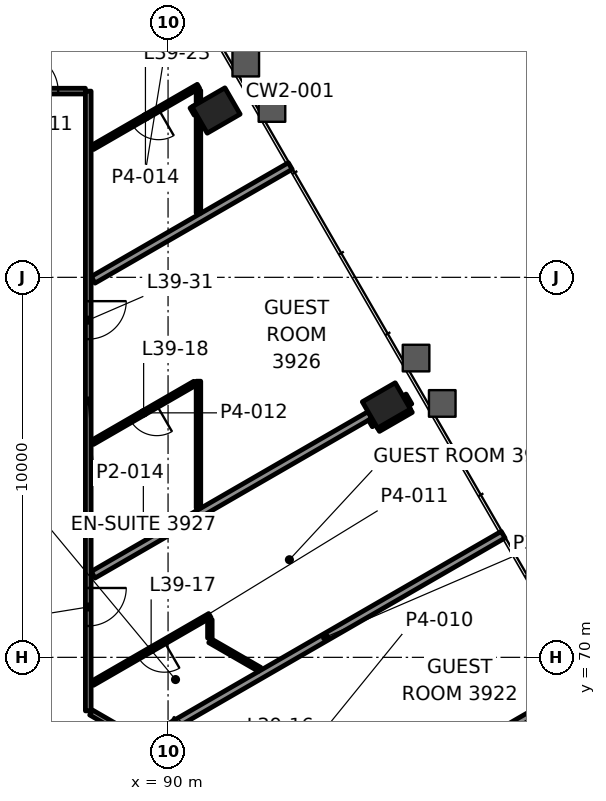
"""IFC4 building model, lengths in metres.
Left out: names, types, materials, properties, quantities, classifications, styles, units other than length and angle.
Written with IfcOpenShell. Run it as: python <this file> out.ifc"""

import sys

from ifc_helpers import new_model, si_unit, direction, frame, frame_2d, origin, origin_2d, place, context, subcontext, project, spatial, rectangle, hollow_rectangle, extrude, element, fill, save


model = new_model("IFC4")
c1 = context("Model", 3, precision=1e-05, world=origin(), true_north=direction((0.0, 1.0)))
c2 = subcontext(c1, "Body", "Model", "MODEL_VIEW")
j1 = project(units=[si_unit("LENGTHUNIT", "METRE"), si_unit("PLANEANGLEUNIT", "RADIAN")], contexts=[c1])
p1 = place(None, origin())
s1 = spatial("IfcSite", under=j1, at=p1, CompositionType="ELEMENT")
p2 = place(p1, origin())
s2 = spatial("IfcBuilding", under=s1, at=p2, CompositionType="ELEMENT")
p3 = place(p2, frame((0.0, 0.0, 171.4)))
s3 = spatial("IfcBuildingStorey", under=s2, at=p3, CompositionType="ELEMENT", Elevation=171.4)
for number, where, z_axis, x_axis in (
    (1, (95.744, 76.628, -0.0), (0.0, 0.0, 1.0), (-0.5, 0.866, 0.0)),
    (2, (91.263, 84.39, -0.0), (0.0, 0.0, 1.0), (-0.5, 0.866, 0.0)),
):
    element("IfcColumn", number, at=place(p3, frame(where, z_axis=z_axis, x_axis=x_axis)), inside=s3, PredefinedType="COLUMN", context=c2, shape_type="SweptSolid", body=[
        extrude(hollow_rectangle(XDim=0.8, YDim=1.0, WallThickness=0.05, at=origin_2d()), origin(), (0.0, 0.0, 1.0), 3.9),
    ])
p4 = place(p3, frame((78.2, 84.9, 0.0), z_axis=(0.0, 0.0, 1.0), x_axis=(1.0, 0.0, 0.0)))
e3 = element("IfcWall", 3, at=p4, inside=s3, PredefinedType="PARTITIONING", context=c2, shape_type="SweptSolid", body=[
    extrude(rectangle(XDim=9.625, YDim=0.15, at=frame_2d((4.812, 0.0))), origin(), (0.0, 0.0, 1.0), 3.1),
])
p5 = place(p4, frame((7.908, 0.0, 0.0)))
e4 = element("IfcOpeningElement", 4, at=p5, cuts=e3, PredefinedType="OPENING", context=c2, shape_type="SweptSolid", body=[
    extrude(rectangle(XDim=1.0, YDim=2.1, at=frame_2d((0.5, 1.05))), frame((0.0, 0.085, 0.0), z_axis=(0.0, -1.0, 0.0), x_axis=(1.0, 0.0, 0.0)), (0.0, 0.0, 1.0), 0.17),
])
p6 = place(p3, frame((93.951, 65.245, 0.0), z_axis=(0.0, 0.0, 1.0), x_axis=(0.866027052535, 0.49999714427, 0.0)))
e5 = element("IfcWall", 5, at=p6, inside=s3, PredefinedType="PARTITIONING", context=c2, shape_type="SweptSolid", body=[
    extrude(rectangle(XDim=6.745, YDim=0.2, at=frame_2d((3.372, 0.0))), origin(), (0.0, 0.0, 1.0), 3.1),
])
p7 = place(p3, frame((89.47, 67.832, 0.0), z_axis=(0.0, 0.0, 1.0), x_axis=(0.866022468619, 0.50000508382, 0.0)))
e6 = element("IfcWall", 6, at=p7, inside=s3, PredefinedType="PARTITIONING", context=c2, shape_type="SweptSolid", body=[
    extrude(rectangle(XDim=10.792, YDim=0.2, at=frame_2d((5.396, 0.0))), origin(), (0.0, 0.0, 1.0), 3.022),
])
p8 = place(p3, frame((91.1, 71.101, 0.0), z_axis=(0.0, 0.0, 1.0), x_axis=(-0.866045460162, -0.499965259726, 0.0)))
e7 = element("IfcWall", 7, at=p8, inside=s3, PredefinedType="PARTITIONING", context=c2, shape_type="SweptSolid", body=[
    extrude(rectangle(XDim=3.569, YDim=0.12, at=frame_2d((1.784, 0.0))), origin(), (0.0, 0.0, 1.0), 3.1),
])
p9 = place(p8, frame((1.384, 0.0, 0.0)))
e8 = element("IfcOpeningElement", 8, at=p9, cuts=e7, PredefinedType="OPENING", context=c2, shape_type="SweptSolid", body=[
    extrude(rectangle(XDim=0.8, YDim=2.1, at=frame_2d((0.4, 1.05))), frame((0.0, 0.07, 0.0), z_axis=(0.0, -1.0, 0.0), x_axis=(1.0, 0.0, 0.0)), (0.0, 0.0, 1.0), 0.14),
])
p10 = place(p3, frame((95.512, 76.032, 0.0), z_axis=(0.0, 0.0, 1.0), x_axis=(0.86597798544, 0.50008212199, 0.0)))
e9 = element("IfcWall", 9, at=p10, inside=s3, PredefinedType="PARTITIONING", context=c2, shape_type="SweptSolid", body=[
    extrude(rectangle(XDim=0.999, YDim=0.2, at=frame_2d((0.5, 0.0))), origin(), (0.0, 0.0, 1.0), 3.022),
])
p11 = place(p3, frame((88.027, 72.173, 0.0), z_axis=(0.0, 0.0, 1.0), x_axis=(0.866035743139, 0.499982091285, 0.0)))
e10 = element("IfcWall", 10, at=p11, inside=s3, PredefinedType="PARTITIONING", context=c2, shape_type="SweptSolid", body=[
    extrude(rectangle(XDim=8.411, YDim=0.2, at=frame_2d((4.206, 0.0))), origin(), (0.0, 0.0, 1.0), 3.1),
])
p12 = place(p3, frame((90.705, 77.212, 0.0), z_axis=(0.0, 0.0, 1.0), x_axis=(-0.866009247561, -0.500027982357, 0.0)))
e11 = element("IfcWall", 11, at=p12, inside=s3, PredefinedType="PARTITIONING", context=c2, shape_type="SweptSolid", body=[
    extrude(rectangle(XDim=3.113, YDim=0.12, at=frame_2d((1.556, 0.0))), origin(), (0.0, 0.0, 1.0), 3.1),
])
p13 = place(p12, frame((1.156, 0.0, 0.0)))
e12 = element("IfcOpeningElement", 12, at=p13, cuts=e11, PredefinedType="OPENING", context=c2, shape_type="SweptSolid", body=[
    extrude(rectangle(XDim=0.8, YDim=2.1, at=frame_2d((0.4, 1.05))), frame((0.0, 0.07, 0.0), z_axis=(0.0, -1.0, 0.0), x_axis=(1.0, 0.0, 0.0)), (0.0, 0.0, 1.0), 0.14),
])
p14 = place(p3, frame((88.027, 79.934, 0.0), z_axis=(0.0, 0.0, 1.0), x_axis=(0.866030178321, 0.499991730169, 0.0)))
e13 = element("IfcWall", 13, at=p14, inside=s3, PredefinedType="PARTITIONING", context=c2, shape_type="SweptSolid", body=[
    extrude(rectangle(XDim=5.991, YDim=0.2, at=frame_2d((2.995, 0.0))), origin(), (0.0, 0.0, 1.0), 3.022),
])
p15 = place(p3, frame((90.8, 85.028, 0.0), z_axis=(0.0, 0.0, 1.0), x_axis=(-0.866010186656, -0.500026355914, 0.0)))
e14 = element("IfcWall", 14, at=p15, inside=s3, PredefinedType="PARTITIONING", context=c2, shape_type="SweptSolid", body=[
    extrude(rectangle(XDim=3.222, YDim=0.12, at=frame_2d((1.611, 0.0))), origin(), (0.0, 0.0, 1.0), 3.022),
])
p16 = place(p15, frame((1.211, 0.0, 0.0)))
e15 = element("IfcOpeningElement", 15, at=p16, cuts=e14, PredefinedType="OPENING", context=c2, shape_type="SweptSolid", body=[
    extrude(rectangle(XDim=0.8, YDim=2.1, at=frame_2d((0.4, 1.05))), frame((0.0, 0.07, 0.0), z_axis=(0.0, -1.0, 0.0), x_axis=(1.0, 0.0, 0.0)), (0.0, 0.0, 1.0), 0.14),
])
p17 = place(p3, frame((83.471, 85.065, 0.0), z_axis=(0.0, 0.0, 1.0), x_axis=(0.866022862013, 0.500004402451, 0.0)))
e16 = element("IfcWall", 16, at=p17, inside=s3, PredefinedType="PARTITIONING", context=c2, shape_type="SweptSolid", body=[
    extrude(rectangle(XDim=7.371, YDim=0.2, at=frame_2d((3.685, 0.0))), origin(), (0.0, 0.0, 1.0), 3.022),
])
p18 = place(p3, frame((91.1, 70.508, 0.0), z_axis=(0.0, 0.0, 1.0), x_axis=(0.0, 1.0, 0.0)))
e17 = element("IfcWall", 17, at=p18, inside=s3, PredefinedType="PARTITIONING", context=c2, shape_type="SweptSolid", body=[
    extrude(rectangle(XDim=0.484, YDim=0.12, at=frame_2d((0.242, 0.0))), origin(), (0.0, 0.0, 1.0), 3.1),
])
p19 = place(p3, frame((90.8, 73.929, 0.0), z_axis=(0.0, 0.0, 1.0), x_axis=(0.0, 1.0, 0.0)))
e18 = element("IfcWall", 18, at=p19, inside=s3, PredefinedType="PARTITIONING", context=c2, shape_type="SweptSolid", body=[
    extrude(rectangle(XDim=3.337, YDim=0.12, at=frame_2d((1.668, 0.0))), origin(), (0.0, 0.0, 1.0), 3.1),
])
p20 = place(p3, frame((90.8, 81.69, 0.0), z_axis=(0.0, 0.0, 1.0), x_axis=(0.0, 1.0, 0.0)))
e19 = element("IfcWall", 19, at=p20, inside=s3, PredefinedType="PARTITIONING", context=c2, shape_type="SweptSolid", body=[
    extrude(rectangle(XDim=2.502, YDim=0.12, at=frame_2d((1.251, 0.0))), origin(), (0.0, 0.0, 1.0), 3.1),
])
p21 = place(p3, frame((90.8, 84.584, 0.0), z_axis=(0.0, 0.0, 1.0), x_axis=(0.0, 1.0, 0.0)))
e20 = element("IfcWall", 20, at=p21, inside=s3, PredefinedType="PARTITIONING", context=c2, shape_type="SweptSolid", body=[
    extrude(rectangle(XDim=0.334, YDim=0.12, at=frame_2d((0.167, 0.0))), origin(), (0.0, 0.0, 1.0), 3.022),
])
p22 = place(p3, frame((87.9, 84.899, 0.0), z_axis=(0.0, 0.0, 1.0), x_axis=(0.0, -1.0, 0.0)))
e21 = element("IfcWall", 21, at=p22, inside=s3, PredefinedType="PARTITIONING", context=c2, shape_type="SweptSolid", body=[
    extrude(rectangle(XDim=16.308, YDim=0.15, at=frame_2d((8.154, 0.0))), origin(), (0.0, 0.0, 1.0), 3.1),
])
p23 = place(p22, frame((5.527, 0.0, 0.0)))
e22 = element("IfcOpeningElement", 22, at=p23, cuts=e21, PredefinedType="OPENING", context=c2, shape_type="SweptSolid", body=[
    extrude(rectangle(XDim=1.0, YDim=2.1, at=frame_2d((0.5, 1.05))), frame((0.0, 0.085, 0.0), z_axis=(0.0, -1.0, 0.0), x_axis=(1.0, 0.0, 0.0)), (0.0, 0.0, 1.0), 0.17),
])
p24 = place(p22, frame((13.074, 0.0, 0.0)))
e23 = element("IfcOpeningElement", 23, at=p24, cuts=e21, PredefinedType="OPENING", context=c2, shape_type="SweptSolid", body=[
    extrude(rectangle(XDim=1.0, YDim=2.1, at=frame_2d((0.5, 1.05))), frame((0.0, 0.085, 0.0), z_axis=(0.0, -1.0, 0.0), x_axis=(1.0, 0.0, 0.0)), (0.0, 0.0, 1.0), 0.17),
])
p25 = place(p3, frame((96.327, 76.619, 0.0), z_axis=(0.0, 0.0, 1.0), x_axis=(-0.49965177357, 0.866226359082, 0.0)))
e24 = element("IfcWall", 24, at=p25, inside=s3, PredefinedType="PARTITIONING", context=c2, shape_type="SweptSolid", body=[
    extrude(rectangle(XDim=0.299, YDim=0.2, at=frame_2d((0.149, 0.0))), origin(), (0.0, 0.0, 1.0), 3.1),
])
p26 = place(p3, frame((95.461, 76.119, 0.0), z_axis=(0.0, 0.0, 1.0), x_axis=(-0.500359323436, 0.865817848887, 0.0)))
e25 = element("IfcWall", 25, at=p26, inside=s3, PredefinedType="PARTITIONING", context=c2, shape_type="SweptSolid", body=[
    extrude(rectangle(XDim=0.199, YDim=0.2, at=frame_2d((0.1, 0.0))), origin(), (0.0, 0.0, 1.0), 3.1),
])
p27 = place(p3, frame((90.74, 84.296, 0.0), z_axis=(0.0, 0.0, 1.0), x_axis=(-0.500333292614, 0.865832891673, 0.0)))
e26 = element("IfcWall", 26, at=p27, inside=s3, PredefinedType="PARTITIONING", context=c2, shape_type="SweptSolid", body=[
    extrude(rectangle(XDim=0.219, YDim=0.12, at=frame_2d((0.109, 0.0))), origin(), (0.0, 0.0, 1.0), 3.1),
])
p28 = place(p3, frame((92.408, 69.684, 0.0), z_axis=(0.0, 0.0, 1.0), x_axis=(-0.865986401109, 0.500067548531, 0.0)))
e27 = element("IfcWall", 27, at=p28, inside=s3, PredefinedType="PARTITIONING", context=c2, shape_type="SweptSolid", body=[
    extrude(rectangle(XDim=1.51, YDim=0.12, at=frame_2d((0.755, 0.0))), origin(), (0.0, 0.0, 1.0), 3.1),
])
p29 = place(p3, frame((87.975, 68.548, 0.0), z_axis=(0.0, 0.0, 1.0), x_axis=(0.866029648708, -0.499992647504, 0.0)))
e28 = element("IfcWall", 28, at=p29, inside=s3, PredefinedType="PARTITIONING", context=c2, shape_type="SweptSolid", body=[
    extrude(rectangle(XDim=15.461, YDim=0.15, at=frame_2d((7.73, 0.0))), origin(), (0.0, 0.0, 1.0), 3.1),
])
p30 = place(p29, frame((1.948, 0.0, 0.0)))
e29 = element("IfcOpeningElement", 29, at=p30, cuts=e28, PredefinedType="OPENING", context=c2, shape_type="SweptSolid", body=[
    extrude(rectangle(XDim=1.0, YDim=2.1, at=frame_2d((0.5, 1.05))), frame((0.0, 0.085, 0.0), z_axis=(0.0, -1.0, 0.0), x_axis=(1.0, 0.0, 0.0)), (0.0, 0.0, 1.0), 0.17),
])
p31 = place(p29, frame((7.602, 0.0, 0.0)))
e30 = element("IfcOpeningElement", 30, at=p31, cuts=e28, PredefinedType="OPENING", context=c2, shape_type="SweptSolid", body=[
    extrude(rectangle(XDim=1.0, YDim=2.1, at=frame_2d((0.5, 1.05))), frame((0.0, 0.085, 0.0), z_axis=(0.0, -1.0, 0.0), x_axis=(1.0, 0.0, 0.0)), (0.0, 0.0, 1.0), 0.17),
])
p32 = place(p5, origin())
e31 = element("IfcDoor", 31, at=p32, inside=s3, OperationType="SINGLE_SWING_LEFT", PredefinedType="DOOR", context=c2, shape_type="SweptSolid", body=[
    extrude(rectangle(XDim=1.0, YDim=2.1, at=frame_2d((0.5, 1.05))), frame((0.0, 0.025, 0.0), z_axis=(0.0, -1.0, 0.0), x_axis=(1.0, 0.0, 0.0)), (0.0, 0.0, 1.0), 0.05),
])
fill(e4, e31)
p33 = place(p9, origin())
e32 = element("IfcDoor", 32, at=p33, inside=s3, OperationType="SINGLE_SWING_LEFT", PredefinedType="DOOR", context=c2, shape_type="SweptSolid", body=[
    extrude(rectangle(XDim=0.8, YDim=2.1, at=frame_2d((0.4, 1.05))), frame((0.0, 0.025, 0.0), z_axis=(0.0, -1.0, 0.0), x_axis=(1.0, 0.0, 0.0)), (0.0, 0.0, 1.0), 0.05),
])
fill(e8, e32)
p34 = place(p13, origin())
e33 = element("IfcDoor", 33, at=p34, inside=s3, OperationType="SINGLE_SWING_LEFT", PredefinedType="DOOR", context=c2, shape_type="SweptSolid", body=[
    extrude(rectangle(XDim=0.8, YDim=2.1, at=frame_2d((0.4, 1.05))), frame((0.0, 0.025, 0.0), z_axis=(0.0, -1.0, 0.0), x_axis=(1.0, 0.0, 0.0)), (0.0, 0.0, 1.0), 0.05),
])
fill(e12, e33)
p35 = place(p16, origin())
e34 = element("IfcDoor", 34, at=p35, inside=s3, OperationType="SINGLE_SWING_LEFT", PredefinedType="DOOR", context=c2, shape_type="SweptSolid", body=[
    extrude(rectangle(XDim=0.8, YDim=2.1, at=frame_2d((0.4, 1.05))), frame((0.0, 0.025, 0.0), z_axis=(0.0, -1.0, 0.0), x_axis=(1.0, 0.0, 0.0)), (0.0, 0.0, 1.0), 0.05),
])
fill(e15, e34)
p36 = place(p23, origin())
e35 = element("IfcDoor", 35, at=p36, inside=s3, OperationType="SINGLE_SWING_RIGHT", PredefinedType="DOOR", context=c2, shape_type="SweptSolid", body=[
    extrude(rectangle(XDim=1.0, YDim=2.1, at=frame_2d((0.5, 1.05))), frame((0.0, 0.025, 0.0), z_axis=(0.0, -1.0, 0.0), x_axis=(1.0, 0.0, 0.0)), (0.0, 0.0, 1.0), 0.05),
])
fill(e22, e35)
p37 = place(p24, origin())
e36 = element("IfcDoor", 36, at=p37, inside=s3, OperationType="SINGLE_SWING_RIGHT", PredefinedType="DOOR", context=c2, shape_type="SweptSolid", body=[
    extrude(rectangle(XDim=1.0, YDim=2.1, at=frame_2d((0.5, 1.05))), frame((0.0, 0.025, 0.0), z_axis=(0.0, -1.0, 0.0), x_axis=(1.0, 0.0, 0.0)), (0.0, 0.0, 1.0), 0.05),
])
fill(e23, e36)
save(model, sys.argv[1])
